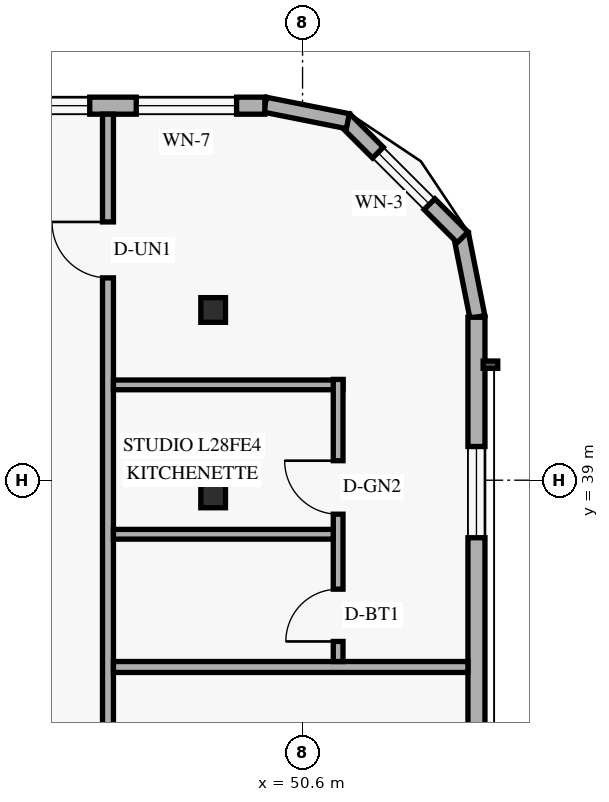
"""IFC4 building model, lengths in metres.
Left out: names, types, materials, properties, quantities, classifications, styles, units other than length and angle.
Written with IfcOpenShell. Run it as: python <this file> out.ifc"""

import sys

from ifc_helpers import new_model, si_unit, direction, frame, frame_2d, origin, origin_2d, place, context, subcontext, project, spatial, rectangle, hollow_rectangle, extrude, element, fill, save


model = new_model("IFC4")
c1 = context("Model", 3, precision=1e-05, world=origin(), true_north=direction((0.0, 1.0)))
c2 = subcontext(c1, "Body", "Model", "MODEL_VIEW")
j1 = project(units=[si_unit("LENGTHUNIT", "METRE"), si_unit("PLANEANGLEUNIT", "RADIAN")], contexts=[c1])
p1 = place(None, origin())
s1 = spatial("IfcSite", under=j1, at=p1, CompositionType="ELEMENT")
p2 = place(p1, origin())
s2 = spatial("IfcBuilding", under=s1, at=p2, CompositionType="ELEMENT")
p3 = place(p2, frame((0.0, 0.0, 109.8)))
s3 = spatial("IfcBuildingStorey", under=s2, at=p3, CompositionType="ELEMENT", Elevation=109.8)
for number, where, z_axis, x_axis in (
    (1, (49.025, 38.75, 0.0), (0.058, 0.0, 0.998), (0.0, 1.0, 0.0)),
    (2, (49.025, 41.8, 0.0), (0.058, 0.0, 0.998), (0.0, 1.0, 0.0)),
):
    element("IfcColumn", number, at=place(p3, frame(where, z_axis=z_axis, x_axis=x_axis)), inside=s3, PredefinedType="COLUMN", context=c2, shape_type="SweptSolid", body=[
        extrude(hollow_rectangle(XDim=0.406, YDim=0.406, WallThickness=0.016, at=origin_2d()), origin(), (0.0, 0.0, 1.0), 3.606),
    ])
p4 = place(p3, frame((53.476, 41.684, 0.0), z_axis=(0.0, 0.0, 1.0), x_axis=(-0.195000137217, 0.980803214965, 0.0)))
e3 = element("IfcWall", 3, at=p4, inside=s3, PredefinedType="SOLIDWALL", context=c2, shape_type="SweptSolid", body=[
    extrude(rectangle(XDim=1.388, YDim=0.25, at=frame_2d((0.694, 0.0))), origin(), (0.0, 0.0, 1.0), 3.36),
])
p5 = place(p3, frame((53.232, 42.995, 0.0), z_axis=(0.0, 0.0, 1.0), x_axis=(-0.707151344399, 0.707062215165, 0.0)))
e4 = element("IfcWall", 4, at=p5, inside=s3, PredefinedType="SOLIDWALL", context=c2, shape_type="SweptSolid", body=[
    extrude(rectangle(XDim=2.739, YDim=0.25, at=frame_2d((1.37, 0.0))), origin(), (0.0, 0.0, 1.0), 3.36),
])
p6 = place(p5, frame((0.77, 0.0, 0.85)))
e5 = element("IfcOpeningElement", 5, at=p6, cuts=e4, PredefinedType="OPENING", context=c2, shape_type="SweptSolid", body=[
    extrude(rectangle(XDim=1.2, YDim=1.5, at=frame_2d((0.6, 0.75))), frame((0.0, 0.135, 0.0), z_axis=(0.0, -1.0, 0.0), x_axis=(1.0, 0.0, 0.0)), (0.0, 0.0, 1.0), 0.27),
])
p7 = place(p3, frame((51.345, 44.905, 0.0), z_axis=(0.0, 0.0, 1.0), x_axis=(-0.980809899341, 0.19496651342, 0.0)))
e6 = element("IfcWall", 6, at=p7, inside=s3, PredefinedType="SOLIDWALL", context=c2, shape_type="SweptSolid", body=[
    extrude(rectangle(XDim=1.389, YDim=0.25, at=frame_2d((0.694, 0.0))), origin(), (0.0, 0.0, 1.0), 3.36),
])
p8 = place(p3, frame((53.46, 25.454, 0.0), z_axis=(0.0, 0.0, 1.0), x_axis=(0.0, 1.0, 0.0)))
e7 = element("IfcWall", 7, at=p8, inside=s3, PredefinedType="SOLIDWALL", context=c2, shape_type="SweptSolid", body=[
    extrude(rectangle(XDim=16.226, YDim=0.28, at=frame_2d((8.113, 0.0))), origin(), (0.0, 0.0, 1.0), 3.36),
])
p9 = place(p8, frame((2.785, 0.0, 0.85)))
e8 = element("IfcOpeningElement", 8, at=p9, cuts=e7, PredefinedType="OPENING", context=c2, shape_type="SweptSolid", body=[
    extrude(rectangle(XDim=1.5, YDim=1.55, at=frame_2d((0.75, 0.775))), frame((0.0, 0.15, 0.0), z_axis=(0.0, -1.0, 0.0), x_axis=(1.0, 0.0, 0.0)), (0.0, 0.0, 1.0), 0.3),
])
p10 = place(p8, frame((8.022, 0.0, 0.85)))
e9 = element("IfcOpeningElement", 9, at=p10, cuts=e7, PredefinedType="OPENING", context=c2, shape_type="SweptSolid", body=[
    extrude(rectangle(XDim=1.5, YDim=1.55, at=frame_2d((0.75, 0.775))), frame((0.0, 0.15, 0.0), z_axis=(0.0, -1.0, 0.0), x_axis=(1.0, 0.0, 0.0)), (0.0, 0.0, 1.0), 0.3),
])
p11 = place(p8, frame((12.6, 0.0, 0.85)))
e10 = element("IfcOpeningElement", 10, at=p11, cuts=e7, PredefinedType="OPENING", context=c2, shape_type="SweptSolid", body=[
    extrude(rectangle(XDim=1.5, YDim=1.55, at=frame_2d((0.75, 0.775))), frame((0.0, 0.15, 0.0), z_axis=(0.0, -1.0, 0.0), x_axis=(1.0, 0.0, 0.0)), (0.0, 0.0, 1.0), 0.3),
])
p12 = place(p3, frame((49.98, 45.16, 0.0), z_axis=(0.0, 0.0, 1.0), x_axis=(-1.0, 0.0, 0.0)))
e11 = element("IfcWall", 11, at=p12, inside=s3, PredefinedType="SOLIDWALL", context=c2, shape_type="SweptSolid", body=[
    extrude(rectangle(XDim=36.56, YDim=0.28, at=frame_2d((18.28, 0.0))), origin(), (0.0, 0.0, 1.0), 3.36),
])
p13 = place(p12, frame((30.99, 0.0, 0.85)))
e12 = element("IfcOpeningElement", 12, at=p13, cuts=e11, PredefinedType="OPENING", context=c2, shape_type="SweptSolid", body=[
    extrude(rectangle(XDim=1.65, YDim=1.6, at=frame_2d((0.825, 0.8))), frame((0.0, 0.15, 0.0), z_axis=(0.0, -1.0, 0.0), x_axis=(1.0, 0.0, 0.0)), (0.0, 0.0, 1.0), 0.3),
])
p14 = place(p12, frame((23.13, 0.0, 0.85)))
e13 = element("IfcOpeningElement", 13, at=p14, cuts=e11, PredefinedType="OPENING", context=c2, shape_type="SweptSolid", body=[
    extrude(rectangle(XDim=1.65, YDim=1.6, at=frame_2d((0.825, 0.8))), frame((0.0, 0.15, 0.0), z_axis=(0.0, -1.0, 0.0), x_axis=(1.0, 0.0, 0.0)), (0.0, 0.0, 1.0), 0.3),
])
p15 = place(p12, frame((16.245, 0.0, 0.85)))
e14 = element("IfcOpeningElement", 14, at=p15, cuts=e11, PredefinedType="OPENING", context=c2, shape_type="SweptSolid", body=[
    extrude(rectangle(XDim=1.65, YDim=1.6, at=frame_2d((0.825, 0.8))), frame((0.0, 0.15, 0.0), z_axis=(0.0, -1.0, 0.0), x_axis=(1.0, 0.0, 0.0)), (0.0, 0.0, 1.0), 0.3),
])
p16 = place(p12, frame((10.64, 0.0, 0.85)))
e15 = element("IfcOpeningElement", 15, at=p16, cuts=e11, PredefinedType="OPENING", context=c2, shape_type="SweptSolid", body=[
    extrude(rectangle(XDim=1.65, YDim=1.6, at=frame_2d((0.825, 0.8))), frame((0.0, 0.15, 0.0), z_axis=(0.0, -1.0, 0.0), x_axis=(1.0, 0.0, 0.0)), (0.0, 0.0, 1.0), 0.3),
])
p17 = place(p12, frame((5.55, 0.0, 0.85)))
e16 = element("IfcOpeningElement", 16, at=p17, cuts=e11, PredefinedType="OPENING", context=c2, shape_type="SweptSolid", body=[
    extrude(rectangle(XDim=1.65, YDim=1.6, at=frame_2d((0.825, 0.8))), frame((0.0, 0.15, 0.0), z_axis=(0.0, -1.0, 0.0), x_axis=(1.0, 0.0, 0.0)), (0.0, 0.0, 1.0), 0.3),
])
p18 = place(p12, frame((2.88, 0.0, 0.85)))
e17 = element("IfcOpeningElement", 17, at=p18, cuts=e11, PredefinedType="OPENING", context=c2, shape_type="SweptSolid", body=[
    extrude(rectangle(XDim=1.2, YDim=1.5, at=frame_2d((0.6, 0.75))), frame((0.0, 0.15, 0.0), z_axis=(0.0, -1.0, 0.0), x_axis=(1.0, 0.0, 0.0)), (0.0, 0.0, 1.0), 0.3),
])
p19 = place(p12, frame((0.465, 0.0, 0.85)))
e18 = element("IfcOpeningElement", 18, at=p19, cuts=e11, PredefinedType="OPENING", context=c2, shape_type="SweptSolid", body=[
    extrude(rectangle(XDim=1.65, YDim=1.6, at=frame_2d((0.825, 0.8))), frame((0.0, 0.15, 0.0), z_axis=(0.0, -1.0, 0.0), x_axis=(1.0, 0.0, 0.0)), (0.0, 0.0, 1.0), 0.3),
])
p20 = place(p3, frame((47.4, 2.98, 0.0), z_axis=(0.0, 0.0, 1.0), x_axis=(0.0, 1.0, 0.0)))
e19 = element("IfcWall", 19, at=p20, inside=s3, PredefinedType="STANDARD", context=c2, shape_type="SweptSolid", body=[
    extrude(rectangle(XDim=42.04, YDim=0.18, at=frame_2d((21.02, 0.0))), origin(), (0.0, 0.0, 1.0), 2.731),
])
p21 = place(p20, frame((4.716, 0.0, 0.0)))
e20 = element("IfcOpeningElement", 20, at=p21, cuts=e19, PredefinedType="OPENING", context=c2, shape_type="SweptSolid", body=[
    extrude(rectangle(XDim=0.92, YDim=2.15, at=frame_2d((0.46, 1.075))), frame((0.0, 0.1, 0.0), z_axis=(0.0, -1.0, 0.0), x_axis=(1.0, 0.0, 0.0)), (0.0, 0.0, 1.0), 0.2),
])
p22 = place(p20, frame((15.796, 0.0, 0.0)))
e21 = element("IfcOpeningElement", 21, at=p22, cuts=e19, PredefinedType="OPENING", context=c2, shape_type="SweptSolid", body=[
    extrude(rectangle(XDim=0.92, YDim=2.15, at=frame_2d((0.46, 1.075))), frame((0.0, 0.1, 0.0), z_axis=(0.0, -1.0, 0.0), x_axis=(1.0, 0.0, 0.0)), (0.0, 0.0, 1.0), 0.2),
])
p23 = place(p20, frame((23.565, 0.0, 0.0)))
e22 = element("IfcOpeningElement", 22, at=p23, cuts=e19, PredefinedType="OPENING", context=c2, shape_type="SweptSolid", body=[
    extrude(rectangle(XDim=0.92, YDim=2.15, at=frame_2d((0.46, 1.075))), frame((0.0, 0.1, 0.0), z_axis=(0.0, -1.0, 0.0), x_axis=(1.0, 0.0, 0.0)), (0.0, 0.0, 1.0), 0.2),
])
p24 = place(p20, frame((39.348, 0.0, 0.0)))
e23 = element("IfcOpeningElement", 23, at=p24, cuts=e19, PredefinedType="OPENING", context=c2, shape_type="SweptSolid", body=[
    extrude(rectangle(XDim=0.92, YDim=2.15, at=frame_2d((0.46, 1.075))), frame((0.0, 0.1, 0.0), z_axis=(0.0, -1.0, 0.0), x_axis=(1.0, 0.0, 0.0)), (0.0, 0.0, 1.0), 0.2),
])
p25 = place(p3, frame((47.49, 35.928, 0.0), z_axis=(0.0, 0.0, 1.0), x_axis=(1.0, 0.0, 0.0)))
e24 = element("IfcWall", 24, at=p25, inside=s3, PredefinedType="PARTITIONING", context=c2, shape_type="SweptSolid", body=[
    extrude(rectangle(XDim=5.83, YDim=0.18, at=frame_2d((2.915, 0.0))), origin(), (0.0, 0.0, 1.0), 2.809),
])
p26 = place(p3, frame((47.49, 40.568, 0.0), z_axis=(0.0, 0.0, 1.0), x_axis=(1.0, 0.0, 0.0)))
e25 = element("IfcWall", 25, at=p26, inside=s3, PredefinedType="PLUMBINGWALL", context=c2, shape_type="SweptSolid", body=[
    extrude(rectangle(XDim=3.775, YDim=0.16, at=frame_2d((1.888, 0.0))), origin(), (0.0, 0.0, 1.0), 2.809),
])
p27 = place(p3, frame((51.185, 36.018, 0.0), z_axis=(0.0, 0.0, 1.0), x_axis=(0.0, 1.0, 0.0)))
e26 = element("IfcWall", 26, at=p27, inside=s3, PredefinedType="PLUMBINGWALL", context=c2, shape_type="SweptSolid", body=[
    extrude(rectangle(XDim=4.64, YDim=0.16, at=frame_2d((2.32, 0.0))), origin(), (0.0, 0.0, 1.0), 3.36),
])
p28 = place(p27, frame((0.33, 0.0, 0.0)))
e27 = element("IfcOpeningElement", 27, at=p28, cuts=e26, PredefinedType="OPENING", context=c2, shape_type="SweptSolid", body=[
    extrude(rectangle(XDim=0.86, YDim=2.12, at=frame_2d((0.43, 1.06))), frame((0.0, 0.09, 0.0), z_axis=(0.0, -1.0, 0.0), x_axis=(1.0, 0.0, 0.0)), (0.0, 0.0, 1.0), 0.18),
])
p29 = place(p27, frame((2.423, 0.0, 0.0)))
e28 = element("IfcOpeningElement", 28, at=p29, cuts=e26, PredefinedType="OPENING", context=c2, shape_type="SweptSolid", body=[
    extrude(rectangle(XDim=0.88, YDim=2.12, at=frame_2d((0.44, 1.06))), frame((0.0, 0.09, 0.0), z_axis=(0.0, -1.0, 0.0), x_axis=(1.0, 0.0, 0.0)), (0.0, 0.0, 1.0), 0.18),
])
p30 = place(p3, frame((47.49, 38.111, 0.0), z_axis=(0.0, 0.0, 1.0), x_axis=(1.0, 0.0, 0.0)))
e29 = element("IfcWall", 29, at=p30, inside=s3, PredefinedType="PLUMBINGWALL", context=c2, shape_type="SweptSolid", body=[
    extrude(rectangle(XDim=3.615, YDim=0.16, at=frame_2d((1.808, 0.0))), origin(), (0.0, 0.0, 1.0), 2.809),
])
p31 = place(p6, origin())
e30 = element("IfcWindow", 30, at=p31, inside=s3, PartitioningType="SINGLE_PANEL", PredefinedType="WINDOW", context=c2, shape_type="SweptSolid", body=[
    extrude(rectangle(XDim=1.2, YDim=1.5, at=frame_2d((0.6, 0.75))), frame((0.0, 0.03, 0.0), z_axis=(0.0, -1.0, 0.0), x_axis=(1.0, 0.0, 0.0)), (0.0, 0.0, 1.0), 0.06),
])
fill(e5, e30)
p32 = place(p11, origin())
e31 = element("IfcWindow", 31, at=p32, inside=s3, PartitioningType="SINGLE_PANEL", PredefinedType="WINDOW", context=c2, shape_type="SweptSolid", body=[
    extrude(rectangle(XDim=1.5, YDim=1.55, at=frame_2d((0.75, 0.775))), frame((0.0, 0.03, 0.0), z_axis=(0.0, -1.0, 0.0), x_axis=(1.0, 0.0, 0.0)), (0.0, 0.0, 1.0), 0.06),
])
fill(e10, e31)
p33 = place(p18, origin())
e32 = element("IfcWindow", 32, at=p33, inside=s3, PartitioningType="SINGLE_PANEL", PredefinedType="WINDOW", context=c2, shape_type="SweptSolid", body=[
    extrude(rectangle(XDim=1.2, YDim=1.5, at=frame_2d((0.6, 0.75))), frame((0.0, 0.03, 0.0), z_axis=(0.0, -1.0, 0.0), x_axis=(1.0, 0.0, 0.0)), (0.0, 0.0, 1.0), 0.06),
])
fill(e17, e32)
p34 = place(p19, origin())
e33 = element("IfcWindow", 33, at=p34, inside=s3, PartitioningType="SINGLE_PANEL", PredefinedType="WINDOW", context=c2, shape_type="SweptSolid", body=[
    extrude(rectangle(XDim=1.65, YDim=1.6, at=frame_2d((0.825, 0.8))), frame((0.0, 0.03, 0.0), z_axis=(0.0, -1.0, 0.0), x_axis=(1.0, 0.0, 0.0)), (0.0, 0.0, 1.0), 0.06),
])
fill(e18, e33)
p35 = place(p24, origin())
e34 = element("IfcDoor", 34, at=p35, inside=s3, OperationType="SINGLE_SWING_RIGHT", PredefinedType="DOOR", context=c2, shape_type="SweptSolid", body=[
    extrude(rectangle(XDim=0.92, YDim=2.15, at=frame_2d((0.46, 1.075))), frame((0.0, 0.025, 0.0), z_axis=(0.0, -1.0, 0.0), x_axis=(1.0, 0.0, 0.0)), (0.0, 0.0, 1.0), 0.05),
])
fill(e23, e34)
p36 = place(p28, origin())
e35 = element("IfcDoor", 35, at=p36, inside=s3, OperationType="SINGLE_SWING_LEFT", PredefinedType="DOOR", context=c2, shape_type="SweptSolid", body=[
    extrude(rectangle(XDim=0.86, YDim=2.12, at=frame_2d((0.43, 1.06))), frame((0.0, 0.025, 0.0), z_axis=(0.0, -1.0, 0.0), x_axis=(1.0, 0.0, 0.0)), (0.0, 0.0, 1.0), 0.05),
])
fill(e27, e35)
p37 = place(p29, origin())
e36 = element("IfcDoor", 36, at=p37, inside=s3, OperationType="SINGLE_SWING_RIGHT", PredefinedType="DOOR", context=c2, shape_type="SweptSolid", body=[
    extrude(rectangle(XDim=0.88, YDim=2.12, at=frame_2d((0.44, 1.06))), frame((0.0, 0.025, 0.0), z_axis=(0.0, -1.0, 0.0), x_axis=(1.0, 0.0, 0.0)), (0.0, 0.0, 1.0), 0.05),
])
fill(e28, e36)
save(model, sys.argv[1])
